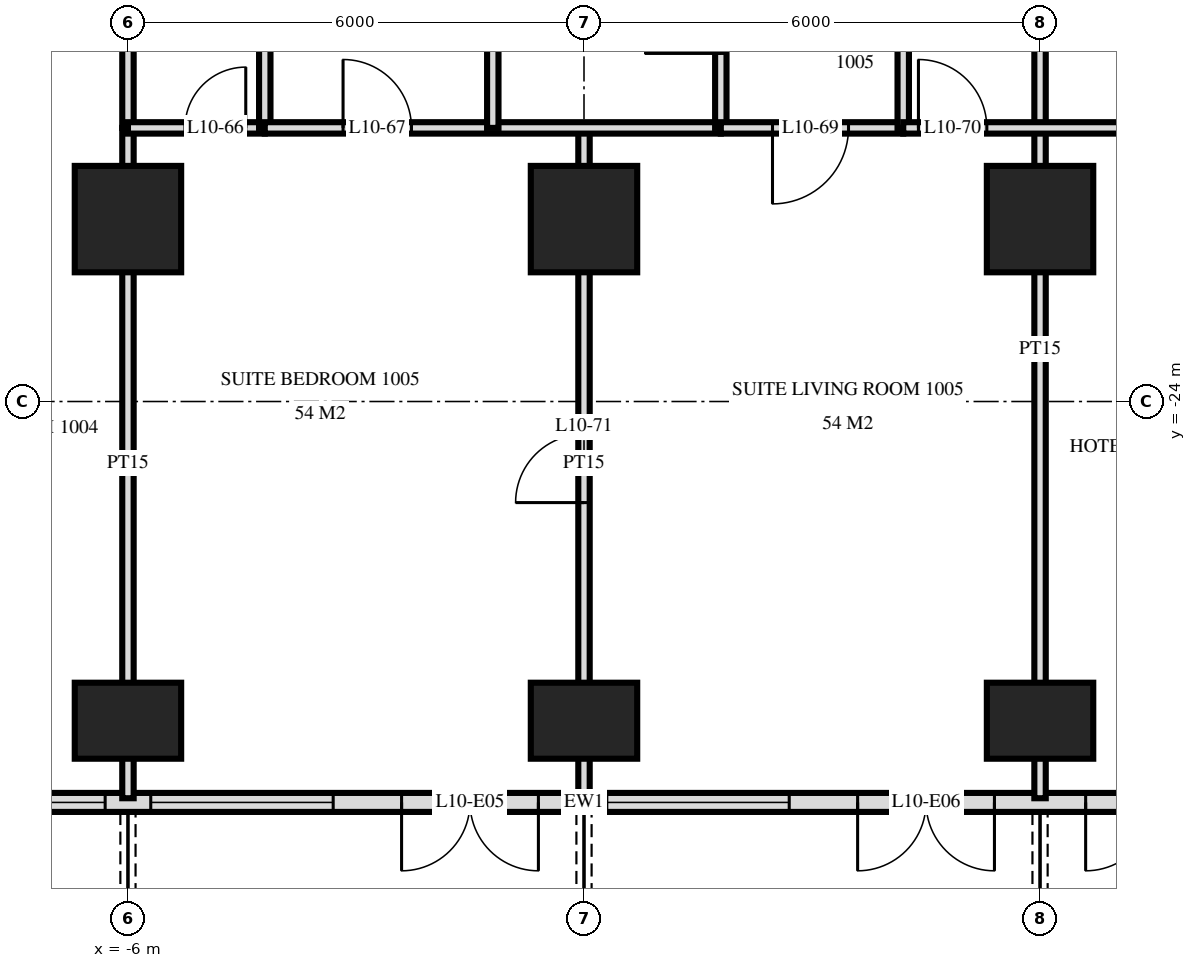
"""IFC4 building model, lengths in metres.
Left out: names, types, materials, properties, quantities, classifications, styles, units other than length and angle.
Written with IfcOpenShell. Run it as: python <this file> out.ifc"""

import sys

from ifc_helpers import new_model, si_unit, direction, frame, frame_2d, origin, origin_2d, place, context, subcontext, project, spatial, rectangle, extrude, element, fill, save


model = new_model("IFC4")
c1 = context("Model", 3, precision=1e-05, world=origin(), true_north=direction((0.0, 1.0)))
c2 = subcontext(c1, "Body", "Model", "MODEL_VIEW")
j1 = project(units=[si_unit("LENGTHUNIT", "METRE"), si_unit("PLANEANGLEUNIT", "RADIAN")], contexts=[c1])
p1 = place(None, origin())
s1 = spatial("IfcSite", under=j1, at=p1, CompositionType="ELEMENT")
p2 = place(p1, origin())
s2 = spatial("IfcBuilding", under=s1, at=p2, CompositionType="ELEMENT")
p3 = place(p2, frame((0.0, 0.0, 45.6)))
s3 = spatial("IfcBuildingStorey", under=s2, at=p3, CompositionType="ELEMENT", Elevation=45.6)
p4 = place(p3, frame((-6.0, -28.2, 0.0), z_axis=(0.0, 0.0, 1.0), x_axis=(1.0, 0.0, 0.0)))
e1 = element("IfcColumn", 1, at=p4, inside=s3, PredefinedType="COLUMN", context=c2, shape_type="SweptSolid", body=[
    extrude(rectangle(XDim=1.4, YDim=1.0, at=origin_2d()), origin(), (0.0, 0.0, 1.0), 3.6),
])
p5 = place(p3, frame((-6.0, -21.6, 0.0), z_axis=(0.0, 0.0, 1.0), x_axis=(1.0, 0.0, 0.0)))
e2 = element("IfcColumn", 2, at=p5, inside=s3, PredefinedType="COLUMN", context=c2, shape_type="SweptSolid", body=[
    extrude(rectangle(XDim=1.4, YDim=1.4, at=origin_2d()), origin(), (0.0, 0.0, 1.0), 3.6),
])
p6 = place(p3, frame((0.0, -28.2, 0.0), z_axis=(0.0, 0.0, 1.0), x_axis=(1.0, 0.0, 0.0)))
e3 = element("IfcColumn", 3, at=p6, inside=s3, PredefinedType="COLUMN", context=c2, shape_type="SweptSolid", body=[
    extrude(rectangle(XDim=1.4, YDim=1.0, at=origin_2d()), origin(), (0.0, 0.0, 1.0), 3.6),
])
p7 = place(p3, frame((0.0, -21.6, 0.0), z_axis=(0.0, 0.0, 1.0), x_axis=(1.0, 0.0, 0.0)))
e4 = element("IfcColumn", 4, at=p7, inside=s3, PredefinedType="COLUMN", context=c2, shape_type="SweptSolid", body=[
    extrude(rectangle(XDim=1.4, YDim=1.4, at=origin_2d()), origin(), (0.0, 0.0, 1.0), 3.6),
])
p8 = place(p3, frame((6.0, -28.2, 0.0), z_axis=(0.0, 0.0, 1.0), x_axis=(1.0, 0.0, 0.0)))
e5 = element("IfcColumn", 5, at=p8, inside=s3, PredefinedType="COLUMN", context=c2, shape_type="SweptSolid", body=[
    extrude(rectangle(XDim=1.4, YDim=1.0, at=origin_2d()), origin(), (0.0, 0.0, 1.0), 3.6),
])
p9 = place(p3, frame((6.0, -21.6, 0.0), z_axis=(0.0, 0.0, 1.0), x_axis=(1.0, 0.0, 0.0)))
e6 = element("IfcColumn", 6, at=p9, inside=s3, PredefinedType="COLUMN", context=c2, shape_type="SweptSolid", body=[
    extrude(rectangle(XDim=1.4, YDim=1.4, at=origin_2d()), origin(), (0.0, 0.0, 1.0), 3.6),
])
p10 = place(p3, frame((-28.775, -29.275, 0.0), z_axis=(0.0, 0.0, 1.0), x_axis=(1.0, 0.0, 0.0)))
e7 = element("IfcWall", 7, at=p10, inside=s3, PredefinedType="SOLIDWALL", context=c2, shape_type="SweptSolid", body=[
    extrude(rectangle(XDim=57.551, YDim=0.25, at=frame_2d((28.775, 0.0))), origin(), (0.0, 0.0, 1.0), 3.32),
])
p11 = place(p10, frame((0.575, 0.0, 0.0)))
e8 = element("IfcOpeningElement", 8, at=p11, cuts=e7, PredefinedType="OPENING", context=c2, shape_type="SweptSolid", body=[
    extrude(rectangle(XDim=1.8, YDim=2.4, at=frame_2d((0.9, 1.2))), frame((0.0, 0.135, 0.0), z_axis=(0.0, -1.0, 0.0), x_axis=(1.0, 0.0, 0.0)), (0.0, 0.0, 1.0), 0.27),
])
p12 = place(p10, frame((5.375, 0.0, 0.0)))
e9 = element("IfcOpeningElement", 9, at=p12, cuts=e7, PredefinedType="OPENING", context=c2, shape_type="SweptSolid", body=[
    extrude(rectangle(XDim=1.8, YDim=2.4, at=frame_2d((0.9, 1.2))), frame((0.0, 0.135, 0.0), z_axis=(0.0, -1.0, 0.0), x_axis=(1.0, 0.0, 0.0)), (0.0, 0.0, 1.0), 0.27),
])
p13 = place(p10, frame((8.075, 0.0, 0.3)))
e10 = element("IfcOpeningElement", 10, at=p13, cuts=e7, PredefinedType="OPENING", context=c2, shape_type="SweptSolid", body=[
    extrude(rectangle(XDim=2.4, YDim=2.1, at=frame_2d((1.2, 1.05))), frame((0.0, 0.135, 0.0), z_axis=(0.0, -1.0, 0.0), x_axis=(1.0, 0.0, 0.0)), (0.0, 0.0, 1.0), 0.27),
])
p14 = place(p10, frame((12.875, 0.0, 0.0)))
e11 = element("IfcOpeningElement", 11, at=p14, cuts=e7, PredefinedType="OPENING", context=c2, shape_type="SweptSolid", body=[
    extrude(rectangle(XDim=1.8, YDim=2.4, at=frame_2d((0.9, 1.2))), frame((0.0, 0.135, 0.0), z_axis=(0.0, -1.0, 0.0), x_axis=(1.0, 0.0, 0.0)), (0.0, 0.0, 1.0), 0.27),
])
p15 = place(p10, frame((17.375, 0.0, 0.0)))
e12 = element("IfcOpeningElement", 12, at=p15, cuts=e7, PredefinedType="OPENING", context=c2, shape_type="SweptSolid", body=[
    extrude(rectangle(XDim=1.8, YDim=2.4, at=frame_2d((0.9, 1.2))), frame((0.0, 0.135, 0.0), z_axis=(0.0, -1.0, 0.0), x_axis=(1.0, 0.0, 0.0)), (0.0, 0.0, 1.0), 0.27),
])
p16 = place(p10, frame((20.075, 0.0, 0.3)))
e13 = element("IfcOpeningElement", 13, at=p16, cuts=e7, PredefinedType="OPENING", context=c2, shape_type="SweptSolid", body=[
    extrude(rectangle(XDim=2.4, YDim=2.1, at=frame_2d((1.2, 1.05))), frame((0.0, 0.135, 0.0), z_axis=(0.0, -1.0, 0.0), x_axis=(1.0, 0.0, 0.0)), (0.0, 0.0, 1.0), 0.27),
])
p17 = place(p10, frame((23.075, 0.0, 0.3)))
e14 = element("IfcOpeningElement", 14, at=p17, cuts=e7, PredefinedType="OPENING", context=c2, shape_type="SweptSolid", body=[
    extrude(rectangle(XDim=2.4, YDim=2.1, at=frame_2d((1.2, 1.05))), frame((0.0, 0.135, 0.0), z_axis=(0.0, -1.0, 0.0), x_axis=(1.0, 0.0, 0.0)), (0.0, 0.0, 1.0), 0.27),
])
p18 = place(p10, frame((26.375, 0.0, 0.0)))
e15 = element("IfcOpeningElement", 15, at=p18, cuts=e7, PredefinedType="OPENING", context=c2, shape_type="SweptSolid", body=[
    extrude(rectangle(XDim=1.8, YDim=2.4, at=frame_2d((0.9, 1.2))), frame((0.0, 0.135, 0.0), z_axis=(0.0, -1.0, 0.0), x_axis=(1.0, 0.0, 0.0)), (0.0, 0.0, 1.0), 0.27),
])
p19 = place(p10, frame((29.075, 0.0, 0.3)))
e16 = element("IfcOpeningElement", 16, at=p19, cuts=e7, PredefinedType="OPENING", context=c2, shape_type="SweptSolid", body=[
    extrude(rectangle(XDim=2.4, YDim=2.1, at=frame_2d((1.2, 1.05))), frame((0.0, 0.135, 0.0), z_axis=(0.0, -1.0, 0.0), x_axis=(1.0, 0.0, 0.0)), (0.0, 0.0, 1.0), 0.27),
])
p20 = place(p10, frame((32.375, 0.0, 0.0)))
e17 = element("IfcOpeningElement", 17, at=p20, cuts=e7, PredefinedType="OPENING", context=c2, shape_type="SweptSolid", body=[
    extrude(rectangle(XDim=1.8, YDim=2.4, at=frame_2d((0.9, 1.2))), frame((0.0, 0.135, 0.0), z_axis=(0.0, -1.0, 0.0), x_axis=(1.0, 0.0, 0.0)), (0.0, 0.0, 1.0), 0.27),
])
p21 = place(p10, frame((35.375, 0.0, 0.0)))
e18 = element("IfcOpeningElement", 18, at=p21, cuts=e7, PredefinedType="OPENING", context=c2, shape_type="SweptSolid", body=[
    extrude(rectangle(XDim=1.8, YDim=2.4, at=frame_2d((0.9, 1.2))), frame((0.0, 0.135, 0.0), z_axis=(0.0, -1.0, 0.0), x_axis=(1.0, 0.0, 0.0)), (0.0, 0.0, 1.0), 0.27),
])
p22 = place(p10, frame((38.075, 0.0, 0.3)))
e19 = element("IfcOpeningElement", 19, at=p22, cuts=e7, PredefinedType="OPENING", context=c2, shape_type="SweptSolid", body=[
    extrude(rectangle(XDim=2.4, YDim=2.1, at=frame_2d((1.2, 1.05))), frame((0.0, 0.135, 0.0), z_axis=(0.0, -1.0, 0.0), x_axis=(1.0, 0.0, 0.0)), (0.0, 0.0, 1.0), 0.27),
])
p23 = place(p10, frame((41.075, 0.0, 0.3)))
e20 = element("IfcOpeningElement", 20, at=p23, cuts=e7, PredefinedType="OPENING", context=c2, shape_type="SweptSolid", body=[
    extrude(rectangle(XDim=2.4, YDim=2.1, at=frame_2d((1.2, 1.05))), frame((0.0, 0.135, 0.0), z_axis=(0.0, -1.0, 0.0), x_axis=(1.0, 0.0, 0.0)), (0.0, 0.0, 1.0), 0.27),
])
p24 = place(p10, frame((44.375, 0.0, 0.0)))
e21 = element("IfcOpeningElement", 21, at=p24, cuts=e7, PredefinedType="OPENING", context=c2, shape_type="SweptSolid", body=[
    extrude(rectangle(XDim=1.8, YDim=2.4, at=frame_2d((0.9, 1.2))), frame((0.0, 0.135, 0.0), z_axis=(0.0, -1.0, 0.0), x_axis=(1.0, 0.0, 0.0)), (0.0, 0.0, 1.0), 0.27),
])
p25 = place(p10, frame((47.075, 0.0, 0.3)))
e22 = element("IfcOpeningElement", 22, at=p25, cuts=e7, PredefinedType="OPENING", context=c2, shape_type="SweptSolid", body=[
    extrude(rectangle(XDim=2.4, YDim=2.1, at=frame_2d((1.2, 1.05))), frame((0.0, 0.135, 0.0), z_axis=(0.0, -1.0, 0.0), x_axis=(1.0, 0.0, 0.0)), (0.0, 0.0, 1.0), 0.27),
])
p26 = place(p10, frame((50.375, 0.0, 0.0)))
e23 = element("IfcOpeningElement", 23, at=p26, cuts=e7, PredefinedType="OPENING", context=c2, shape_type="SweptSolid", body=[
    extrude(rectangle(XDim=1.8, YDim=2.4, at=frame_2d((0.9, 1.2))), frame((0.0, 0.135, 0.0), z_axis=(0.0, -1.0, 0.0), x_axis=(1.0, 0.0, 0.0)), (0.0, 0.0, 1.0), 0.27),
])
p27 = place(p10, frame((53.375, 0.0, 0.0)))
e24 = element("IfcOpeningElement", 24, at=p27, cuts=e7, PredefinedType="OPENING", context=c2, shape_type="SweptSolid", body=[
    extrude(rectangle(XDim=1.8, YDim=2.4, at=frame_2d((0.9, 1.2))), frame((0.0, 0.135, 0.0), z_axis=(0.0, -1.0, 0.0), x_axis=(1.0, 0.0, 0.0)), (0.0, 0.0, 1.0), 0.27),
])
p28 = place(p3, frame((6.0, -29.22, 0.0), z_axis=(0.0, 0.0, 1.0), x_axis=(0.0, 1.0, 0.0)))
e25 = element("IfcWall", 25, at=p28, inside=s3, PredefinedType="PARTITIONING", context=c2, shape_type="SweptSolid", body=[
    extrude(rectangle(XDim=11.82, YDim=0.15, at=frame_2d((5.91, 0.0))), origin(), (0.0, 0.0, 1.0), 3.32),
])
p29 = place(p3, frame((4.2, -20.4, 0.0), z_axis=(0.0, 0.0, 1.0), x_axis=(0.0, 1.0, 0.0)))
e26 = element("IfcWall", 26, at=p29, inside=s3, PredefinedType="PARTITIONING", context=c2, shape_type="SweptSolid", body=[
    extrude(rectangle(XDim=3.0, YDim=0.15, at=frame_2d((1.5, 0.0))), origin(), (0.0, 0.0, 1.0), 3.32),
])
p30 = place(p3, frame((1.8, -20.4, 0.0), z_axis=(0.0, 0.0, 1.0), x_axis=(0.0, 1.0, 0.0)))
e27 = element("IfcWall", 27, at=p30, inside=s3, PredefinedType="PARTITIONING", context=c2, shape_type="SweptSolid", body=[
    extrude(rectangle(XDim=3.0, YDim=0.15, at=frame_2d((1.5, 0.0))), origin(), (0.0, 0.0, 1.0), 3.32),
])
p31 = place(p30, frame((0.98, 0.0, 0.0)))
e28 = element("IfcOpeningElement", 28, at=p31, cuts=e27, PredefinedType="OPENING", context=c2, shape_type="SweptSolid", body=[
    extrude(rectangle(XDim=1.0, YDim=2.1, at=frame_2d((0.5, 1.05))), frame((0.0, 0.085, 0.0), z_axis=(0.0, -1.0, 0.0), x_axis=(1.0, 0.0, 0.0)), (0.0, 0.0, 1.0), 0.17),
])
p32 = place(p3, frame((0.0, -29.22, 0.0), z_axis=(0.0, 0.0, 1.0), x_axis=(0.0, 1.0, 0.0)))
e29 = element("IfcWall", 29, at=p32, inside=s3, PredefinedType="PARTITIONING", context=c2, shape_type="SweptSolid", body=[
    extrude(rectangle(XDim=8.82, YDim=0.15, at=frame_2d((4.41, 0.0))), origin(), (0.0, 0.0, 1.0), 3.32),
])
p33 = place(p32, frame((3.89, 0.0, 0.0)))
e30 = element("IfcOpeningElement", 30, at=p33, cuts=e29, PredefinedType="OPENING", context=c2, shape_type="SweptSolid", body=[
    extrude(rectangle(XDim=0.9, YDim=2.1, at=frame_2d((0.45, 1.05))), frame((0.0, 0.085, 0.0), z_axis=(0.0, -1.0, 0.0), x_axis=(1.0, 0.0, 0.0)), (0.0, 0.0, 1.0), 0.17),
])
p34 = place(p3, frame((-1.2, -20.4, 0.0), z_axis=(0.0, 0.0, 1.0), x_axis=(0.0, 1.0, 0.0)))
e31 = element("IfcWall", 31, at=p34, inside=s3, PredefinedType="PARTITIONING", context=c2, shape_type="SweptSolid", body=[
    extrude(rectangle(XDim=3.0, YDim=0.15, at=frame_2d((1.5, 0.0))), origin(), (0.0, 0.0, 1.0), 3.32),
])
p35 = place(p3, frame((-4.2, -20.4, 0.0), z_axis=(0.0, 0.0, 1.0), x_axis=(0.0, 1.0, 0.0)))
e32 = element("IfcWall", 32, at=p35, inside=s3, PredefinedType="PLUMBINGWALL", context=c2, shape_type="SweptSolid", body=[
    extrude(rectangle(XDim=3.0, YDim=0.15, at=frame_2d((1.5, 0.0))), origin(), (0.0, 0.0, 1.0), 3.32),
])
p36 = place(p3, frame((-6.0, -29.22, 0.0), z_axis=(0.0, 0.0, 1.0), x_axis=(0.0, 1.0, 0.0)))
e33 = element("IfcWall", 33, at=p36, inside=s3, PredefinedType="PARTITIONING", context=c2, shape_type="SweptSolid", body=[
    extrude(rectangle(XDim=8.82, YDim=0.15, at=frame_2d((4.41, 0.0))), origin(), (0.0, 0.0, 1.0), 3.32),
])
p37 = place(p3, frame((-6.0, -20.4, 0.0), z_axis=(0.0, 0.0, 1.0), x_axis=(0.0, 1.0, 0.0)))
e34 = element("IfcWall", 34, at=p37, inside=s3, PredefinedType="PLUMBINGWALL", context=c2, shape_type="SweptSolid", body=[
    extrude(rectangle(XDim=3.0, YDim=0.15, at=frame_2d((1.5, 0.0))), origin(), (0.0, 0.0, 1.0), 3.32),
])
p38 = place(p3, frame((1.8, -20.4, 0.0), z_axis=(0.0, 0.0, 1.0), x_axis=(1.0, 0.0, 0.0)))
e35 = element("IfcWall", 35, at=p38, inside=s3, PredefinedType="PARTITIONING", context=c2, shape_type="SweptSolid", body=[
    extrude(rectangle(XDim=2.4, YDim=0.15, at=frame_2d((1.2, 0.0))), origin(), (0.0, 0.0, 1.0), 3.32),
])
p39 = place(p38, frame((0.68, 0.0, 0.0)))
e36 = element("IfcOpeningElement", 36, at=p39, cuts=e35, PredefinedType="OPENING", context=c2, shape_type="SweptSolid", body=[
    extrude(rectangle(XDim=1.0, YDim=2.1, at=frame_2d((0.5, 1.05))), frame((0.0, 0.085, 0.0), z_axis=(0.0, -1.0, 0.0), x_axis=(1.0, 0.0, 0.0)), (0.0, 0.0, 1.0), 0.17),
])
p40 = place(p3, frame((-4.2, -20.4, 0.0), z_axis=(0.0, 0.0, 1.0), x_axis=(1.0, 0.0, 0.0)))
e37 = element("IfcWall", 37, at=p40, inside=s3, PredefinedType="PARTITIONING", context=c2, shape_type="SweptSolid", body=[
    extrude(rectangle(XDim=6.0, YDim=0.15, at=frame_2d((3.0, 0.0))), origin(), (0.0, 0.0, 1.0), 3.32),
])
p41 = place(p40, frame((1.03, 0.0, 0.0)))
e38 = element("IfcOpeningElement", 38, at=p41, cuts=e37, PredefinedType="OPENING", context=c2, shape_type="SweptSolid", body=[
    extrude(rectangle(XDim=0.9, YDim=2.1, at=frame_2d((0.45, 1.05))), frame((0.0, 0.085, 0.0), z_axis=(0.0, -1.0, 0.0), x_axis=(1.0, 0.0, 0.0)), (0.0, 0.0, 1.0), 0.17),
])
p42 = place(p3, frame((4.2, -20.4, 0.0), z_axis=(0.0, 0.0, 1.0), x_axis=(1.0, 0.0, 0.0)))
e39 = element("IfcWall", 39, at=p42, inside=s3, PredefinedType="PARTITIONING", context=c2, shape_type="SweptSolid", body=[
    extrude(rectangle(XDim=3.5, YDim=0.15, at=frame_2d((1.75, 0.0))), origin(), (0.0, 0.0, 1.0), 3.32),
])
p43 = place(p42, frame((0.2, 0.0, 0.0)))
e40 = element("IfcOpeningElement", 40, at=p43, cuts=e39, PredefinedType="OPENING", context=c2, shape_type="SweptSolid", body=[
    extrude(rectangle(XDim=0.9, YDim=2.1, at=frame_2d((0.45, 1.05))), frame((0.0, 0.085, 0.0), z_axis=(0.0, -1.0, 0.0), x_axis=(1.0, 0.0, 0.0)), (0.0, 0.0, 1.0), 0.17),
])
p44 = place(p3, frame((-6.0, -20.4, 0.0), z_axis=(0.0, 0.0, 1.0), x_axis=(1.0, 0.0, 0.0)))
e41 = element("IfcWall", 41, at=p44, inside=s3, PredefinedType="PLUMBINGWALL", context=c2, shape_type="SweptSolid", body=[
    extrude(rectangle(XDim=1.8, YDim=0.15, at=frame_2d((0.9, 0.0))), origin(), (0.0, 0.0, 1.0), 3.32),
])
p45 = place(p44, frame((0.75, 0.0, 0.0)))
e42 = element("IfcOpeningElement", 42, at=p45, cuts=e41, PredefinedType="OPENING", context=c2, shape_type="SweptSolid", body=[
    extrude(rectangle(XDim=0.8, YDim=2.1, at=frame_2d((0.4, 1.05))), frame((0.0, 0.085, 0.0), z_axis=(0.0, -1.0, 0.0), x_axis=(1.0, 0.0, 0.0)), (0.0, 0.0, 1.0), 0.17),
])
p46 = place(p16, origin())
e43 = element("IfcWindow", 43, at=p46, inside=s3, PartitioningType="SINGLE_PANEL", PredefinedType="WINDOW", context=c2, shape_type="SweptSolid", body=[
    extrude(rectangle(XDim=2.4, YDim=2.1, at=frame_2d((1.2, 1.05))), frame((0.0, 0.03, 0.0), z_axis=(0.0, -1.0, 0.0), x_axis=(1.0, 0.0, 0.0)), (0.0, 0.0, 1.0), 0.06),
])
fill(e13, e43)
p47 = place(p17, origin())
e44 = element("IfcWindow", 44, at=p47, inside=s3, PartitioningType="SINGLE_PANEL", PredefinedType="WINDOW", context=c2, shape_type="SweptSolid", body=[
    extrude(rectangle(XDim=2.4, YDim=2.1, at=frame_2d((1.2, 1.05))), frame((0.0, 0.03, 0.0), z_axis=(0.0, -1.0, 0.0), x_axis=(1.0, 0.0, 0.0)), (0.0, 0.0, 1.0), 0.06),
])
fill(e14, e44)
p48 = place(p18, frame((0.9, 0.0, 0.0), z_axis=(0.0, 0.0, 1.0), x_axis=(-1.0, 0.0, 0.0)))
e45 = element("IfcDoor", 45, at=p48, inside=s3, OperationType="DOUBLE_DOOR_SINGLE_SWING", PredefinedType="DOOR", context=c2, shape_type="SweptSolid", body=[
    extrude(rectangle(XDim=1.8, YDim=2.4, at=frame_2d((0.0, 1.2))), frame((0.0, -0.025, 0.0), z_axis=(0.0, 1.0, 0.0), x_axis=(-1.0, 0.0, 0.0)), (0.0, 0.0, 1.0), 0.05),
])
fill(e15, e45)
p49 = place(p19, origin())
e46 = element("IfcWindow", 46, at=p49, inside=s3, PartitioningType="SINGLE_PANEL", PredefinedType="WINDOW", context=c2, shape_type="SweptSolid", body=[
    extrude(rectangle(XDim=2.4, YDim=2.1, at=frame_2d((1.2, 1.05))), frame((0.0, 0.03, 0.0), z_axis=(0.0, -1.0, 0.0), x_axis=(1.0, 0.0, 0.0)), (0.0, 0.0, 1.0), 0.06),
])
fill(e16, e46)
p50 = place(p20, frame((0.9, 0.0, 0.0), z_axis=(0.0, 0.0, 1.0), x_axis=(-1.0, 0.0, 0.0)))
e47 = element("IfcDoor", 47, at=p50, inside=s3, OperationType="DOUBLE_DOOR_SINGLE_SWING", PredefinedType="DOOR", context=c2, shape_type="SweptSolid", body=[
    extrude(rectangle(XDim=1.8, YDim=2.4, at=frame_2d((0.0, 1.2))), frame((0.0, -0.025, 0.0), z_axis=(0.0, 1.0, 0.0), x_axis=(-1.0, 0.0, 0.0)), (0.0, 0.0, 1.0), 0.05),
])
fill(e17, e47)
p51 = place(p21, frame((0.9, 0.0, 0.0), z_axis=(0.0, 0.0, 1.0), x_axis=(-1.0, 0.0, 0.0)))
e48 = element("IfcDoor", 48, at=p51, inside=s3, OperationType="DOUBLE_DOOR_SINGLE_SWING", PredefinedType="DOOR", context=c2, shape_type="SweptSolid", body=[
    extrude(rectangle(XDim=1.8, YDim=2.4, at=frame_2d((0.0, 1.2))), frame((0.0, -0.025, 0.0), z_axis=(0.0, 1.0, 0.0), x_axis=(-1.0, 0.0, 0.0)), (0.0, 0.0, 1.0), 0.05),
])
fill(e18, e48)
p52 = place(p45, origin())
e49 = element("IfcDoor", 49, at=p52, inside=s3, OperationType="SINGLE_SWING_LEFT", PredefinedType="DOOR", context=c2, shape_type="SweptSolid", body=[
    extrude(rectangle(XDim=0.8, YDim=2.1, at=frame_2d((0.4, 1.05))), frame((0.0, 0.025, 0.0), z_axis=(0.0, -1.0, 0.0), x_axis=(1.0, 0.0, 0.0)), (0.0, 0.0, 1.0), 0.05),
])
fill(e42, e49)
p53 = place(p41, origin())
e50 = element("IfcDoor", 50, at=p53, inside=s3, OperationType="SINGLE_SWING_RIGHT", PredefinedType="DOOR", context=c2, shape_type="SweptSolid", body=[
    extrude(rectangle(XDim=0.9, YDim=2.1, at=frame_2d((0.45, 1.05))), frame((0.0, 0.025, 0.0), z_axis=(0.0, -1.0, 0.0), x_axis=(1.0, 0.0, 0.0)), (0.0, 0.0, 1.0), 0.05),
])
fill(e38, e50)
p54 = place(p31, origin())
e51 = element("IfcDoor", 51, at=p54, inside=s3, OperationType="SINGLE_SWING_RIGHT", PredefinedType="DOOR", context=c2, shape_type="SweptSolid", body=[
    extrude(rectangle(XDim=1.0, YDim=2.1, at=frame_2d((0.5, 1.05))), frame((0.0, 0.025, 0.0), z_axis=(0.0, -1.0, 0.0), x_axis=(1.0, 0.0, 0.0)), (0.0, 0.0, 1.0), 0.05),
])
fill(e28, e51)
p55 = place(p39, frame((0.5, 0.0, 0.0), z_axis=(0.0, 0.0, 1.0), x_axis=(-1.0, 0.0, 0.0)))
e52 = element("IfcDoor", 52, at=p55, inside=s3, OperationType="SINGLE_SWING_LEFT", PredefinedType="DOOR", context=c2, shape_type="SweptSolid", body=[
    extrude(rectangle(XDim=1.0, YDim=2.1, at=frame_2d((0.0, 1.05))), frame((0.0, -0.025, 0.0), z_axis=(0.0, 1.0, 0.0), x_axis=(-1.0, 0.0, 0.0)), (0.0, 0.0, 1.0), 0.05),
])
fill(e36, e52)
p56 = place(p43, origin())
e53 = element("IfcDoor", 53, at=p56, inside=s3, OperationType="SINGLE_SWING_RIGHT", PredefinedType="DOOR", context=c2, shape_type="SweptSolid", body=[
    extrude(rectangle(XDim=0.9, YDim=2.1, at=frame_2d((0.45, 1.05))), frame((0.0, 0.025, 0.0), z_axis=(0.0, -1.0, 0.0), x_axis=(1.0, 0.0, 0.0)), (0.0, 0.0, 1.0), 0.05),
])
fill(e40, e53)
p57 = place(p33, origin())
e54 = element("IfcDoor", 54, at=p57, inside=s3, OperationType="SINGLE_SWING_RIGHT", PredefinedType="DOOR", context=c2, shape_type="SweptSolid", body=[
    extrude(rectangle(XDim=0.9, YDim=2.1, at=frame_2d((0.45, 1.05))), frame((0.0, 0.025, 0.0), z_axis=(0.0, -1.0, 0.0), x_axis=(1.0, 0.0, 0.0)), (0.0, 0.0, 1.0), 0.05),
])
fill(e30, e54)
save(model, sys.argv[1])
